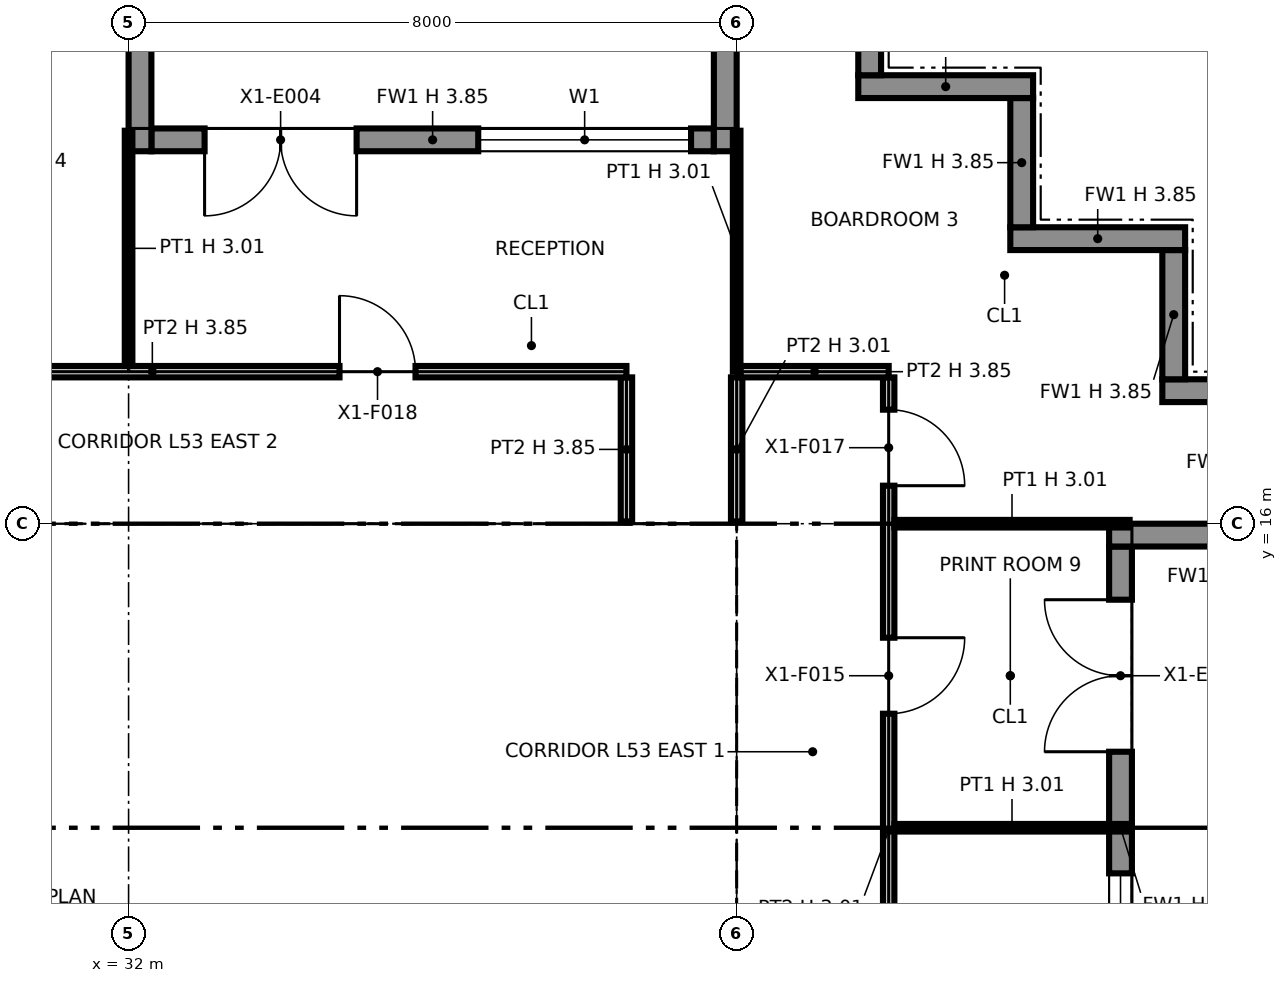
"""IFC4 building model, lengths in metres.
Left out: names, types, materials, properties, quantities, classifications, styles, units other than length and angle.
Written with IfcOpenShell. Run it as: python <this file> out.ifc"""

import sys

from ifc_helpers import new_model, si_unit, direction, frame, frame_2d, origin, origin_2d, place, context, subcontext, project, spatial, polyline, rectangle, i_section, outline, extrude, element, fill, save


model = new_model("IFC4")
c1 = context("Model", 3, precision=1e-05, world=origin(), true_north=direction((0.0, 1.0)))
c2 = subcontext(c1, "Body", "Model", "MODEL_VIEW")
j1 = project(units=[si_unit("LENGTHUNIT", "METRE"), si_unit("PLANEANGLEUNIT", "RADIAN")], contexts=[c1])
p1 = place(None, origin())
s1 = spatial("IfcSite", under=j1, at=p1, CompositionType="ELEMENT")
p2 = place(p1, origin())
s2 = spatial("IfcBuilding", under=s1, at=p2, CompositionType="ELEMENT")
p3 = place(p2, frame((0.0, 0.0, 247.0)))
s3 = spatial("IfcBuildingStorey", under=s2, at=p3, CompositionType="ELEMENT", Elevation=247.0)
for number, where, z_axis, x_axis in (
    (1, (32.0, 16.0, 0.0), (0.0, 0.0, 1.0), (1.0, 0.0, 0.0)),
    (2, (40.0, 16.0, 0.0), (0.0, 0.0, 1.0), (1.0, 0.0, 0.0)),
):
    element("IfcColumn", number, at=place(p3, frame(where, z_axis=z_axis, x_axis=x_axis)), inside=s3, PredefinedType="COLUMN", context=c2, shape_type="SweptSolid", body=[
        extrude(i_section(OverallWidth=0.371, OverallDepth=0.361, WebThickness=0.012, FlangeThickness=0.02, at=origin_2d()), origin(), (0.0, 0.0, 1.0), 3.85),
    ])
p4 = place(p3, frame((45.05, 8.3, 0.0), z_axis=(0.0, 0.0, 1.0), x_axis=(0.0, 1.0, 0.0)))
e3 = element("IfcWall", 3, at=p4, inside=s3, PredefinedType="SOLIDWALL", context=c2, shape_type="SweptSolid", body=[
    extrude(rectangle(XDim=7.4, YDim=0.3, at=frame_2d((3.7, 0.0))), origin(), (0.0, 0.0, 1.0), 3.85),
])
p5 = place(p4, frame((0.3, 0.0, 0.9)))
e4 = element("IfcOpeningElement", 4, at=p5, cuts=e3, PredefinedType="OPENING", context=c2, shape_type="SweptSolid", body=[
    extrude(rectangle(XDim=2.8, YDim=2.2, at=frame_2d((1.4, 1.1))), frame((0.0, 0.16, 0.0), z_axis=(0.0, -1.0, 0.0), x_axis=(1.0, 0.0, 0.0)), (0.0, 0.0, 1.0), 0.32),
])
p6 = place(p4, frame((4.7, 0.0, 0.0)))
e5 = element("IfcOpeningElement", 5, at=p6, cuts=e3, PredefinedType="OPENING", context=c2, shape_type="SweptSolid", body=[
    extrude(rectangle(XDim=2.0, YDim=2.4, at=frame_2d((1.0, 1.2))), frame((0.0, 0.16, 0.0), z_axis=(0.0, -1.0, 0.0), x_axis=(1.0, 0.0, 0.0)), (0.0, 0.0, 1.0), 0.32),
])
p7 = place(p3, frame((47.9, 15.85, 0.0), z_axis=(0.0, 0.0, 1.0), x_axis=(-1.0, 0.0, 0.0)))
e6 = element("IfcWall", 6, at=p7, inside=s3, PredefinedType="SOLIDWALL", context=c2, shape_type="SweptSolid", body=[
    extrude(rectangle(XDim=3.0, YDim=0.3, at=frame_2d((1.5, 0.0))), origin(), (0.0, 0.0, 1.0), 3.171),
])
p8 = place(p3, frame((47.9, 17.75, 0.0), z_axis=(0.0, 0.0, 1.0), x_axis=(-1.0, 0.0, 0.0)))
e7 = element("IfcWall", 7, at=p8, inside=s3, PredefinedType="SOLIDWALL", context=c2, shape_type="SweptSolid", body=[
    extrude(rectangle(XDim=2.3, YDim=0.3, at=frame_2d((1.15, 0.0))), origin(), (0.0, 0.0, 1.0), 3.85),
])
p9 = place(p3, frame((45.75, 17.9, 0.0), z_axis=(0.0, 0.0, 1.0), x_axis=(0.0, 1.0, 0.0)))
e8 = element("IfcWall", 8, at=p9, inside=s3, PredefinedType="SOLIDWALL", context=c2, shape_type="SweptSolid", body=[
    extrude(rectangle(XDim=1.7, YDim=0.3, at=frame_2d((0.85, 0.0))), origin(), (0.0, 0.0, 1.0), 3.85),
])
p10 = place(p3, frame((45.9, 19.75, 0.0), z_axis=(0.0, 0.0, 1.0), x_axis=(-1.0, 0.0, 0.0)))
e9 = element("IfcWall", 9, at=p10, inside=s3, PredefinedType="SOLIDWALL", context=c2, shape_type="SweptSolid", body=[
    extrude(rectangle(XDim=2.3, YDim=0.3, at=frame_2d((1.15, 0.0))), origin(), (0.0, 0.0, 1.0), 3.85),
])
p11 = place(p3, frame((43.75, 19.9, 0.0), z_axis=(0.0, 0.0, 1.0), x_axis=(0.0, 1.0, 0.0)))
e10 = element("IfcWall", 10, at=p11, inside=s3, PredefinedType="SOLIDWALL", context=c2, shape_type="SweptSolid", body=[
    extrude(rectangle(XDim=1.7, YDim=0.3, at=frame_2d((0.85, 0.0))), origin(), (0.0, 0.0, 1.0), 3.85),
])
p12 = place(p3, frame((43.9, 21.75, 0.0), z_axis=(0.0, 0.0, 1.0), x_axis=(-1.0, 0.0, 0.0)))
e11 = element("IfcWall", 11, at=p12, inside=s3, PredefinedType="SOLIDWALL", context=c2, shape_type="SweptSolid", body=[
    extrude(rectangle(XDim=2.3, YDim=0.3, at=frame_2d((1.15, 0.0))), origin(), (0.0, 0.0, 1.0), 3.85),
])
p13 = place(p3, frame((41.75, 21.9, 0.0), z_axis=(0.0, 0.0, 1.0), x_axis=(0.0, 1.0, 0.0)))
e12 = element("IfcWall", 12, at=p13, inside=s3, PredefinedType="SOLIDWALL", context=c2, shape_type="SweptSolid", body=[
    extrude(rectangle(XDim=1.7, YDim=0.3, at=frame_2d((0.85, 0.0))), origin(), (0.0, 0.0, 1.0), 3.85),
])
p14 = place(p3, frame((39.7, 21.05, 0.0), z_axis=(0.0, 0.0, 1.0), x_axis=(-1.0, 0.0, 0.0)))
e13 = element("IfcWall", 13, at=p14, inside=s3, PredefinedType="SOLIDWALL", context=c2, shape_type="SweptSolid", body=[
    extrude(rectangle(XDim=7.4, YDim=0.3, at=frame_2d((3.7, 0.0))), origin(), (0.0, 0.0, 1.0), 3.85),
])
p15 = place(p14, frame((0.3, 0.0, 0.9)))
e14 = element("IfcOpeningElement", 14, at=p15, cuts=e13, PredefinedType="OPENING", context=c2, shape_type="SweptSolid", body=[
    extrude(rectangle(XDim=2.8, YDim=2.2, at=frame_2d((1.4, 1.1))), frame((0.0, 0.16, 0.0), z_axis=(0.0, -1.0, 0.0), x_axis=(1.0, 0.0, 0.0)), (0.0, 0.0, 1.0), 0.32),
])
p16 = place(p14, frame((4.7, 0.0, 0.0)))
e15 = element("IfcOpeningElement", 15, at=p16, cuts=e13, PredefinedType="OPENING", context=c2, shape_type="SweptSolid", body=[
    extrude(rectangle(XDim=2.0, YDim=2.4, at=frame_2d((1.0, 1.2))), frame((0.0, 0.16, 0.0), z_axis=(0.0, -1.0, 0.0), x_axis=(1.0, 0.0, 0.0)), (0.0, 0.0, 1.0), 0.32),
])
p17 = place(p3, frame((39.85, 23.9, 0.0), z_axis=(0.0, 0.0, 1.0), x_axis=(0.0, -1.0, 0.0)))
e16 = element("IfcWall", 16, at=p17, inside=s3, PredefinedType="SOLIDWALL", context=c2, shape_type="SweptSolid", body=[
    extrude(rectangle(XDim=3.0, YDim=0.3, at=frame_2d((1.5, 0.0))), origin(), (0.0, 0.0, 1.0), 3.171),
])
p18 = place(p3, frame((32.15, 23.9, 0.0), z_axis=(0.0, 0.0, 1.0), x_axis=(0.0, -1.0, 0.0)))
e17 = element("IfcWall", 17, at=p18, inside=s3, PredefinedType="SOLIDWALL", context=c2, shape_type="SweptSolid", body=[
    extrude(rectangle(XDim=3.0, YDim=0.3, at=frame_2d((1.5, 0.0))), origin(), (0.0, 0.0, 1.0), 3.237),
])
p19 = place(p3, frame((24.65, 15.25, 0.0), z_axis=(0.0, 0.0, 1.0), x_axis=(1.0, 0.0, 0.0)))
e18 = element("IfcWall", 18, at=p19, inside=s3, PredefinedType="PARTITIONING", context=c2, shape_type="SweptSolid", body=[
    extrude(outline(polyline([(0.0, 0.0), (14.7, 0.0), (14.7, 3.85), (7.438, 3.85), (7.438, 3.308), (7.262, 3.308), (7.261, 3.85), (0.0, 3.85), (0.0, 0.0)])), frame((0.0, 0.1, 0.0), z_axis=(0.0, -1.0, 0.0), x_axis=(1.0, 0.0, 0.0)), (0.0, 0.0, 1.0), 0.2),
])
p20 = place(p19, frame((2.85, 0.0, 0.0)))
e19 = element("IfcOpeningElement", 19, at=p20, cuts=e18, PredefinedType="OPENING", context=c2, shape_type="SweptSolid", body=[
    extrude(rectangle(XDim=1.8, YDim=2.1, at=frame_2d((0.9, 1.05))), frame((0.0, 0.11, 0.0), z_axis=(0.0, -1.0, 0.0), x_axis=(1.0, 0.0, 0.0)), (0.0, 0.0, 1.0), 0.22),
])
p21 = place(p19, frame((9.95, 0.0, 0.0), z_axis=(0.0, 0.0, 1.0), x_axis=(-1.0, 0.0, 0.0)))
e20 = element("IfcOpeningElement", 20, at=p21, cuts=e18, PredefinedType="OPENING", context=c2, shape_type="SweptSolid", body=[
    extrude(rectangle(XDim=1.4, YDim=2.1, at=frame_2d((0.7, 1.05))), frame((0.0, 0.11, 0.0), z_axis=(0.0, -1.0, 0.0), x_axis=(1.0, 0.0, 0.0)), (0.0, 0.0, 1.0), 0.22),
])
p22 = place(p19, frame((13.4, 0.0, 0.0), z_axis=(0.0, 0.0, 1.0), x_axis=(-1.0, 0.0, 0.0)))
e21 = element("IfcOpeningElement", 21, at=p22, cuts=e18, PredefinedType="OPENING", context=c2, shape_type="SweptSolid", body=[
    extrude(rectangle(XDim=1.4, YDim=2.1, at=frame_2d((0.7, 1.05))), frame((0.0, 0.11, 0.0), z_axis=(0.0, -1.0, 0.0), x_axis=(1.0, 0.0, 0.0)), (0.0, 0.0, 1.0), 0.22),
])
p23 = place(p3, frame((24.85, 11.5, 0.0), z_axis=(0.0, 0.0, 1.0), x_axis=(1.0, 0.0, 0.0)))
e22 = element("IfcWall", 22, at=p23, inside=s3, PredefinedType="PARTITIONING", context=c2, shape_type="SweptSolid", body=[
    extrude(outline(polyline([(0.0, 0.0), (7.45, 0.0), (7.45, 3.85), (7.239, 3.85), (7.238, 3.308), (7.062, 3.308), (7.062, 3.85), (0.0, 3.85), (0.0, 0.0)])), frame((0.0, 0.1, 0.0), z_axis=(0.0, -1.0, 0.0), x_axis=(1.0, 0.0, 0.0)), (0.0, 0.0, 1.0), 0.2),
])
p24 = place(p23, frame((0.575, 0.0, 0.0)))
e23 = element("IfcOpeningElement", 23, at=p24, cuts=e22, PredefinedType="OPENING", context=c2, shape_type="SweptSolid", body=[
    extrude(rectangle(XDim=1.1, YDim=2.1, at=frame_2d((0.55, 1.05))), frame((0.0, 0.11, 0.0), z_axis=(0.0, -1.0, 0.0), x_axis=(1.0, 0.0, 0.0)), (0.0, 0.0, 1.0), 0.22),
])
p25 = place(p23, frame((2.95, 0.0, 0.0)))
e24 = element("IfcOpeningElement", 24, at=p25, cuts=e22, PredefinedType="OPENING", context=c2, shape_type="SweptSolid", body=[
    extrude(rectangle(XDim=1.1, YDim=2.1, at=frame_2d((0.55, 1.05))), frame((0.0, 0.11, 0.0), z_axis=(0.0, -1.0, 0.0), x_axis=(1.0, 0.0, 0.0)), (0.0, 0.0, 1.0), 0.22),
])
p26 = place(p23, frame((5.25, 0.0, 0.0)))
e25 = element("IfcOpeningElement", 25, at=p26, cuts=e22, PredefinedType="OPENING", context=c2, shape_type="SweptSolid", body=[
    extrude(rectangle(XDim=1.1, YDim=2.1, at=frame_2d((0.55, 1.05))), frame((0.0, 0.11, 0.0), z_axis=(0.0, -1.0, 0.0), x_axis=(1.0, 0.0, 0.0)), (0.0, 0.0, 1.0), 0.22),
])
p27 = place(p3, frame((29.4, 13.475, 0.0), z_axis=(0.0, 0.0, 1.0), x_axis=(1.0, 0.0, 0.0)))
e26 = element("IfcWall", 26, at=p27, inside=s3, PredefinedType="PARTITIONING", context=c2, shape_type="SweptSolid", body=[
    extrude(outline(polyline([(0.0, 0.0), (2.9, 0.0), (2.9, 3.85), (2.688, 3.85), (2.688, 3.308), (2.512, 3.308), (2.511, 3.85), (0.0, 3.85), (0.0, 0.0)])), frame((0.0, 0.075, 0.0), z_axis=(0.0, -1.0, 0.0), x_axis=(1.0, 0.0, 0.0)), (0.0, 0.0, 1.0), 0.15),
])
p28 = place(p3, frame((32.0, 8.85, 0.0), z_axis=(0.0, 0.0, 1.0), x_axis=(0.0, 1.0, 0.0)))
e27 = element("IfcWall", 27, at=p28, inside=s3, PredefinedType="PARTITIONING", context=c2, shape_type="SweptSolid", body=[
    extrude(rectangle(XDim=2.55, YDim=0.6, at=frame_2d((1.275, 0.0))), origin(), (0.0, 0.0, 1.0), 3.308),
])
p29 = place(p3, frame((32.0, 11.6, 0.0), z_axis=(0.0, 0.0, 1.0), x_axis=(0.0, 1.0, 0.0)))
e28 = element("IfcWall", 28, at=p29, inside=s3, PredefinedType="PARTITIONING", context=c2, shape_type="SweptSolid", body=[
    extrude(rectangle(XDim=1.8, YDim=0.6, at=frame_2d((0.9, 0.0))), origin(), (0.0, 0.0, 1.0), 3.308),
])
p30 = place(p3, frame((32.0, 13.55, 0.0), z_axis=(0.0, 0.0, 1.0), x_axis=(0.0, 1.0, 0.0)))
e29 = element("IfcWall", 29, at=p30, inside=s3, PredefinedType="PARTITIONING", context=c2, shape_type="SweptSolid", body=[
    extrude(rectangle(XDim=1.6, YDim=0.6, at=frame_2d((0.8, 0.0))), origin(), (0.0, 0.0, 1.0), 3.308),
])
for number, where, z_axis, x_axis in (
    (30, (35.6, 8.85, 0.0), (0.0, 0.0, 1.0), (0.0, 1.0, 0.0)),
    (31, (39.25, 8.85, 0.0), (0.0, 0.0, 1.0), (0.0, 1.0, 0.0)),
):
    element("IfcWall", number, at=place(p3, frame(where, z_axis=z_axis, x_axis=x_axis)), inside=s3, PredefinedType="PARTITIONING", context=c2, shape_type="SweptSolid", body=[
        extrude(rectangle(XDim=6.3, YDim=0.2, at=frame_2d((3.15, 0.0))), origin(), (0.0, 0.0, 1.0), 3.85),
    ])
p31 = place(p3, frame((42.0, 6.0, 0.0), z_axis=(0.0, 0.0, 1.0), x_axis=(0.0, 1.0, 0.0)))
e32 = element("IfcWall", 32, at=p31, inside=s3, PredefinedType="PARTITIONING", context=c2, shape_type="SweptSolid", body=[
    extrude(rectangle(XDim=11.925, YDim=0.15, at=frame_2d((5.962, 0.0))), origin(), (0.0, 0.0, 1.0), 3.014),
])
p32 = place(p31, frame((4.5, 0.0, 0.0), z_axis=(0.0, 0.0, 1.0), x_axis=(-1.0, 0.0, 0.0)))
e33 = element("IfcOpeningElement", 33, at=p32, cuts=e32, PredefinedType="OPENING", context=c2, shape_type="SweptSolid", body=[
    extrude(rectangle(XDim=1.0, YDim=2.1, at=frame_2d((0.5, 1.05))), frame((0.0, 0.085, 0.0), z_axis=(0.0, -1.0, 0.0), x_axis=(1.0, 0.0, 0.0)), (0.0, 0.0, 1.0), 0.17),
])
p33 = place(p31, frame((8.5, 0.0, 0.0), z_axis=(0.0, 0.0, 1.0), x_axis=(-1.0, 0.0, 0.0)))
e34 = element("IfcOpeningElement", 34, at=p33, cuts=e32, PredefinedType="OPENING", context=c2, shape_type="SweptSolid", body=[
    extrude(rectangle(XDim=1.0, YDim=2.1, at=frame_2d((0.5, 1.05))), frame((0.0, 0.085, 0.0), z_axis=(0.0, -1.0, 0.0), x_axis=(1.0, 0.0, 0.0)), (0.0, 0.0, 1.0), 0.17),
])
p34 = place(p31, frame((11.5, 0.0, 0.0), z_axis=(0.0, 0.0, 1.0), x_axis=(-1.0, 0.0, 0.0)))
e35 = element("IfcOpeningElement", 35, at=p34, cuts=e32, PredefinedType="OPENING", context=c2, shape_type="SweptSolid", body=[
    extrude(rectangle(XDim=1.0, YDim=2.1, at=frame_2d((0.5, 1.05))), frame((0.0, 0.085, 0.0), z_axis=(0.0, -1.0, 0.0), x_axis=(1.0, 0.0, 0.0)), (0.0, 0.0, 1.0), 0.17),
])
for number, where, z_axis, x_axis in (
    (36, (42.075, 12.0, 0.0), (0.0, 0.0, 1.0), (1.0, 0.0, 0.0)),
    (37, (42.075, 16.0, 0.0), (0.0, 0.0, 1.0), (1.0, 0.0, 0.0)),
):
    element("IfcWall", number, at=place(p3, frame(where, z_axis=z_axis, x_axis=x_axis)), inside=s3, PredefinedType="PARTITIONING", context=c2, shape_type="SweptSolid", body=[
        extrude(rectangle(XDim=3.095, YDim=0.1, at=frame_2d((1.547, 0.0))), origin(), (0.0, 0.0, 1.0), 3.014),
    ])
p35 = place(p3, frame((38.55, 16.03, 0.0), z_axis=(0.0, 0.0, 1.0), x_axis=(0.0, 1.0, 0.0)))
e38 = element("IfcWall", 38, at=p35, inside=s3, PredefinedType="PARTITIONING", context=c2, shape_type="SweptSolid", body=[
    extrude(rectangle(XDim=1.895, YDim=0.15, at=frame_2d((0.948, 0.0))), origin(), (0.0, 0.0, 1.0), 3.85),
])
p36 = place(p3, frame((40.0, 16.03, 0.0), z_axis=(0.0, 0.0, 1.0), x_axis=(0.0, 1.0, 0.0)))
e39 = element("IfcWall", 39, at=p36, inside=s3, PredefinedType="PARTITIONING", context=c2, shape_type="SweptSolid", body=[
    extrude(rectangle(XDim=1.895, YDim=0.15, at=frame_2d((0.948, 0.0))), origin(), (0.0, 0.0, 1.0), 3.014),
])
p37 = place(p3, frame((26.075, 18.0, 0.0), z_axis=(0.0, 0.0, 1.0), x_axis=(1.0, 0.0, 0.0)))
e40 = element("IfcWall", 40, at=p37, inside=s3, PredefinedType="PARTITIONING", context=c2, shape_type="SweptSolid", body=[
    extrude(rectangle(XDim=12.475, YDim=0.15, at=frame_2d((6.238, 0.0))), origin(), (0.0, 0.0, 1.0), 3.85),
])
p38 = place(p37, frame((8.7, 0.0, 0.0)))
e41 = element("IfcOpeningElement", 41, at=p38, cuts=e40, PredefinedType="OPENING", context=c2, shape_type="SweptSolid", body=[
    extrude(rectangle(XDim=1.0, YDim=2.1, at=frame_2d((0.5, 1.05))), frame((0.0, 0.085, 0.0), z_axis=(0.0, -1.0, 0.0), x_axis=(1.0, 0.0, 0.0)), (0.0, 0.0, 1.0), 0.17),
])
p39 = place(p37, frame((2.925, 0.0, 0.0)))
e42 = element("IfcOpeningElement", 42, at=p39, cuts=e40, PredefinedType="OPENING", context=c2, shape_type="SweptSolid", body=[
    extrude(rectangle(XDim=1.0, YDim=2.1, at=frame_2d((0.5, 1.05))), frame((0.0, 0.085, 0.0), z_axis=(0.0, -1.0, 0.0), x_axis=(1.0, 0.0, 0.0)), (0.0, 0.0, 1.0), 0.17),
])
p40 = place(p3, frame((32.0, 18.075, 0.0), z_axis=(0.0, 0.0, 1.0), x_axis=(0.0, 1.0, 0.0)))
e43 = element("IfcWall", 43, at=p40, inside=s3, PredefinedType="PARTITIONING", context=c2, shape_type="SweptSolid", body=[
    extrude(rectangle(XDim=3.095, YDim=0.1, at=frame_2d((1.547, 0.0))), origin(), (0.0, 0.0, 1.0), 3.014),
])
p41 = place(p3, frame((40.05, 18.0, 0.0), z_axis=(0.0, 0.0, 1.0), x_axis=(1.0, 0.0, 0.0)))
e44 = element("IfcWall", 44, at=p41, inside=s3, PredefinedType="PARTITIONING", context=c2, shape_type="SweptSolid", body=[
    extrude(rectangle(XDim=1.95, YDim=0.15, at=frame_2d((0.975, 0.0))), origin(), (0.0, 0.0, 1.0), 3.85),
])
p42 = place(p3, frame((40.0, 18.0, 0.0), z_axis=(0.0, 0.0, 1.0), x_axis=(0.0, 1.0, 0.0)))
e45 = element("IfcWall", 45, at=p42, inside=s3, PredefinedType="PARTITIONING", context=c2, shape_type="SweptSolid", body=[
    extrude(rectangle(XDim=3.17, YDim=0.1, at=frame_2d((1.585, 0.0))), origin(), (0.0, 0.0, 1.0), 3.014),
])
p43 = place(p5, origin())
e46 = element("IfcWindow", 46, at=p43, inside=s3, PartitioningType="SINGLE_PANEL", PredefinedType="WINDOW", context=c2, shape_type="SweptSolid", body=[
    extrude(rectangle(XDim=2.8, YDim=2.2, at=frame_2d((1.4, 1.1))), frame((0.0, 0.03, 0.0), z_axis=(0.0, -1.0, 0.0), x_axis=(1.0, 0.0, 0.0)), (0.0, 0.0, 1.0), 0.06),
])
fill(e4, e46)
p44 = place(p6, origin())
e47 = element("IfcDoor", 47, at=p44, inside=s3, OperationType="DOUBLE_DOOR_SINGLE_SWING", PredefinedType="DOOR", context=c2, shape_type="SweptSolid", body=[
    extrude(rectangle(XDim=2.0, YDim=2.4, at=frame_2d((1.0, 1.2))), frame((0.0, 0.025, 0.0), z_axis=(0.0, -1.0, 0.0), x_axis=(1.0, 0.0, 0.0)), (0.0, 0.0, 1.0), 0.05),
])
fill(e5, e47)
p45 = place(p15, origin())
e48 = element("IfcWindow", 48, at=p45, inside=s3, PartitioningType="SINGLE_PANEL", PredefinedType="WINDOW", context=c2, shape_type="SweptSolid", body=[
    extrude(rectangle(XDim=2.8, YDim=2.2, at=frame_2d((1.4, 1.1))), frame((0.0, 0.03, 0.0), z_axis=(0.0, -1.0, 0.0), x_axis=(1.0, 0.0, 0.0)), (0.0, 0.0, 1.0), 0.06),
])
fill(e14, e48)
p46 = place(p16, origin())
e49 = element("IfcDoor", 49, at=p46, inside=s3, OperationType="DOUBLE_DOOR_SINGLE_SWING", PredefinedType="DOOR", context=c2, shape_type="SweptSolid", body=[
    extrude(rectangle(XDim=2.0, YDim=2.4, at=frame_2d((1.0, 1.2))), frame((0.0, 0.025, 0.0), z_axis=(0.0, -1.0, 0.0), x_axis=(1.0, 0.0, 0.0)), (0.0, 0.0, 1.0), 0.05),
])
fill(e15, e49)
p47 = place(p26, origin())
e50 = element("IfcDoor", 50, at=p47, inside=s3, OperationType="SLIDING_TO_LEFT", PredefinedType="NOTDEFINED", context=c2, shape_type="SweptSolid", body=[
    extrude(rectangle(XDim=1.1, YDim=2.1, at=frame_2d((0.55, 1.05))), frame((0.0, 0.025, 0.0), z_axis=(0.0, -1.0, 0.0), x_axis=(1.0, 0.0, 0.0)), (0.0, 0.0, 1.0), 0.05),
])
fill(e25, e50)
p48 = place(p21, origin())
e51 = element("IfcDoor", 51, at=p48, inside=s3, OperationType="DOUBLE_DOOR_SINGLE_SWING", PredefinedType="NOTDEFINED", context=c2, shape_type="SweptSolid", body=[
    extrude(rectangle(XDim=1.4, YDim=2.1, at=frame_2d((0.7, 1.05))), frame((0.0, 0.025, 0.0), z_axis=(0.0, -1.0, 0.0), x_axis=(1.0, 0.0, 0.0)), (0.0, 0.0, 1.0), 0.05),
])
fill(e20, e51)
p49 = place(p22, origin())
e52 = element("IfcDoor", 52, at=p49, inside=s3, OperationType="DOUBLE_DOOR_SINGLE_SWING", PredefinedType="NOTDEFINED", context=c2, shape_type="SweptSolid", body=[
    extrude(rectangle(XDim=1.4, YDim=2.1, at=frame_2d((0.7, 1.05))), frame((0.0, 0.025, 0.0), z_axis=(0.0, -1.0, 0.0), x_axis=(1.0, 0.0, 0.0)), (0.0, 0.0, 1.0), 0.05),
])
fill(e21, e52)
p50 = place(p33, origin())
e53 = element("IfcDoor", 53, at=p50, inside=s3, OperationType="SINGLE_SWING_LEFT", PredefinedType="DOOR", context=c2, shape_type="SweptSolid", body=[
    extrude(rectangle(XDim=1.0, YDim=2.1, at=frame_2d((0.5, 1.05))), frame((0.0, 0.025, 0.0), z_axis=(0.0, -1.0, 0.0), x_axis=(1.0, 0.0, 0.0)), (0.0, 0.0, 1.0), 0.05),
])
fill(e34, e53)
p51 = place(p34, origin())
e54 = element("IfcDoor", 54, at=p51, inside=s3, OperationType="SINGLE_SWING_RIGHT", PredefinedType="DOOR", context=c2, shape_type="SweptSolid", body=[
    extrude(rectangle(XDim=1.0, YDim=2.1, at=frame_2d((0.5, 1.05))), frame((0.0, 0.025, 0.0), z_axis=(0.0, -1.0, 0.0), x_axis=(1.0, 0.0, 0.0)), (0.0, 0.0, 1.0), 0.05),
])
fill(e35, e54)
p52 = place(p38, origin())
e55 = element("IfcDoor", 55, at=p52, inside=s3, OperationType="SINGLE_SWING_LEFT", PredefinedType="DOOR", context=c2, shape_type="SweptSolid", body=[
    extrude(rectangle(XDim=1.0, YDim=2.1, at=frame_2d((0.5, 1.05))), frame((0.0, 0.025, 0.0), z_axis=(0.0, -1.0, 0.0), x_axis=(1.0, 0.0, 0.0)), (0.0, 0.0, 1.0), 0.05),
])
fill(e41, e55)
save(model, sys.argv[1])
